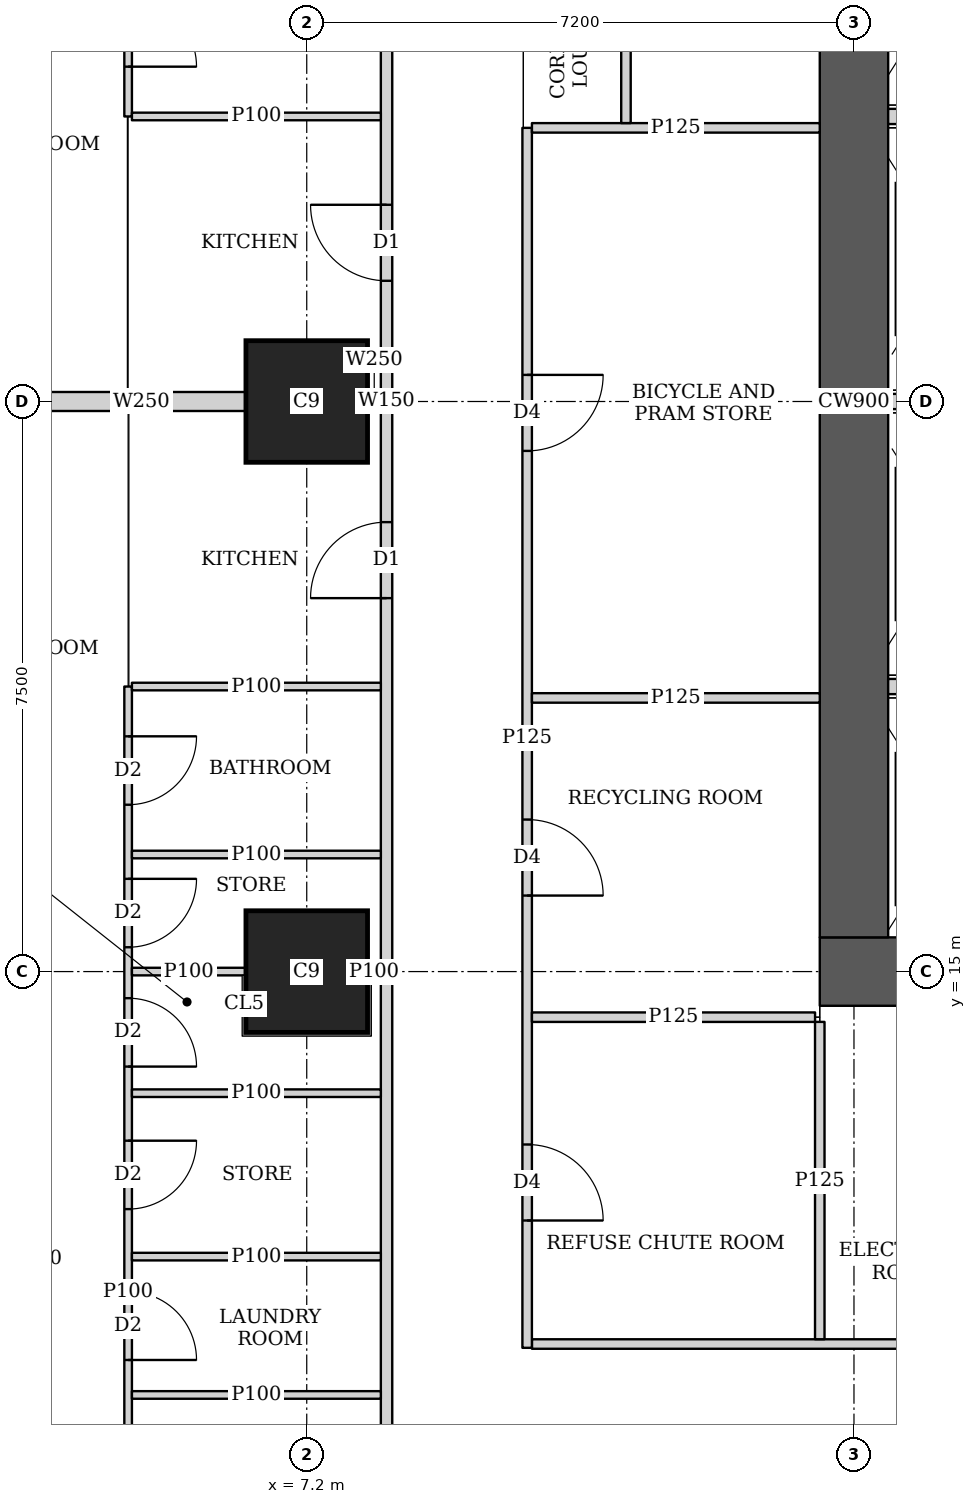
"""IFC4 building model, lengths in metres.
Left out: names, types, materials, properties, quantities, classifications, styles, units other than length and angle.
Written with IfcOpenShell. Run it as: python <this file> out.ifc"""

import sys

from ifc_helpers import new_model, si_unit, direction, frame, frame_2d, origin, origin_2d, place, context, subcontext, project, spatial, rectangle, extrude, element, fill, save


model = new_model("IFC4")
c1 = context("Model", 3, precision=1e-05, world=origin(), true_north=direction((0.0, 1.0)))
c2 = subcontext(c1, "Body", "Model", "MODEL_VIEW")
j1 = project(units=[si_unit("LENGTHUNIT", "METRE"), si_unit("PLANEANGLEUNIT", "RADIAN")], contexts=[c1])
p1 = place(None, origin())
s1 = spatial("IfcSite", under=j1, at=p1, CompositionType="ELEMENT")
p2 = place(p1, origin())
s2 = spatial("IfcBuilding", under=s1, at=p2, CompositionType="ELEMENT")
p3 = place(p2, frame((0.0, 0.0, 81.65)))
s3 = spatial("IfcBuildingStorey", under=s2, at=p3, CompositionType="ELEMENT", Elevation=81.65)
for number, where, z_axis, x_axis in (
    (1, (7.2, 15.0, 0.0), (0.0, 0.0, 1.0), (1.0, 0.0, 0.0)),
    (2, (7.2, 22.5, 0.0), (0.0, 0.0, 1.0), (1.0, 0.0, 0.0)),
):
    element("IfcColumn", number, at=place(p3, frame(where, z_axis=z_axis, x_axis=x_axis)), inside=s3, PredefinedType="COLUMN", context=c2, shape_type="SweptSolid", body=[
        extrude(rectangle(XDim=1.6, YDim=1.6, at=origin_2d()), origin(), (0.0, 0.0, 1.0), 3.75),
    ])
p4 = place(p3, frame((13.95, 15.0, 0.0), z_axis=(0.0, 0.0, 1.0), x_axis=(1.0, 0.0, 0.0)))
e3 = element("IfcWall", 3, at=p4, inside=s3, PredefinedType="SHEAR", context=c2, shape_type="SweptSolid", body=[
    extrude(rectangle(XDim=15.3, YDim=0.9, at=frame_2d((7.65, 0.0))), origin(), (0.0, 0.0, 1.0), 3.75),
])
p5 = place(p4, frame((4.45, 0.0, 0.0)))
e4 = element("IfcOpeningElement", 4, at=p5, cuts=e3, PredefinedType="OPENING", context=c2, shape_type="SweptSolid", body=[
    extrude(rectangle(XDim=1.8, YDim=2.1, at=frame_2d((0.9, 1.05))), frame((0.0, 0.46, 0.0), z_axis=(0.0, -1.0, 0.0), x_axis=(1.0, 0.0, 0.0)), (0.0, 0.0, 1.0), 0.92),
])
p6 = place(p4, frame((10.7, 0.0, 0.0)))
e5 = element("IfcOpeningElement", 5, at=p6, cuts=e3, PredefinedType="OPENING", context=c2, shape_type="SweptSolid", body=[
    extrude(rectangle(XDim=1.1, YDim=2.1, at=frame_2d((0.55, 1.05))), frame((0.0, 0.46, 0.0), z_axis=(0.0, -1.0, 0.0), x_axis=(1.0, 0.0, 0.0)), (0.0, 0.0, 1.0), 0.92),
])
p7 = place(p3, frame((14.4, 15.45, 0.0), z_axis=(0.0, 0.0, 1.0), x_axis=(0.0, 1.0, 0.0)))
e6 = element("IfcWall", 6, at=p7, inside=s3, PredefinedType="SHEAR", context=c2, shape_type="SweptSolid", body=[
    extrude(rectangle(XDim=14.1, YDim=0.9, at=frame_2d((7.05, 0.0))), origin(), (0.0, 0.0, 1.0), 3.75),
])
p8 = place(p3, frame((8.25, 2.126, 0.0), z_axis=(0.0, 0.0, 1.0), x_axis=(0.0, 1.0, 0.0)))
e7 = element("IfcWall", 7, at=p8, inside=s3, PredefinedType="SOLIDWALL", context=c2, shape_type="SweptSolid", body=[
    extrude(rectangle(XDim=40.773, YDim=0.15, at=frame_2d((20.386, 0.0))), origin(), (0.0, 0.0, 1.0), 3.5),
])
p9 = place(p8, frame((17.787, 0.0, 0.0)))
e8 = element("IfcOpeningElement", 8, at=p9, cuts=e7, PredefinedType="OPENING", context=c2, shape_type="SweptSolid", body=[
    extrude(rectangle(XDim=1.0, YDim=2.1, at=frame_2d((0.5, 1.05))), frame((0.0, 0.085, 0.0), z_axis=(0.0, -1.0, 0.0), x_axis=(1.0, 0.0, 0.0)), (0.0, 0.0, 1.0), 0.17),
])
p10 = place(p8, frame((21.962, 0.0, 0.0)))
e9 = element("IfcOpeningElement", 9, at=p10, cuts=e7, PredefinedType="OPENING", context=c2, shape_type="SweptSolid", body=[
    extrude(rectangle(XDim=1.0, YDim=2.1, at=frame_2d((0.5, 1.05))), frame((0.0, 0.085, 0.0), z_axis=(0.0, -1.0, 0.0), x_axis=(1.0, 0.0, 0.0)), (0.0, 0.0, 1.0), 0.17),
])
p11 = place(p8, frame((32.787, 0.0, 0.0)))
e10 = element("IfcOpeningElement", 10, at=p11, cuts=e7, PredefinedType="OPENING", context=c2, shape_type="SweptSolid", body=[
    extrude(rectangle(XDim=1.0, YDim=2.1, at=frame_2d((0.5, 1.05))), frame((0.0, 0.085, 0.0), z_axis=(0.0, -1.0, 0.0), x_axis=(1.0, 0.0, 0.0)), (0.0, 0.0, 1.0), 0.17),
])
p12 = place(p3, frame((4.85, 2.812, 0.0), z_axis=(0.0, 0.0, 1.0), x_axis=(0.0, 1.0, 0.0)))
e11 = element("IfcWall", 11, at=p12, inside=s3, PredefinedType="PARTITIONING", context=c2, shape_type="SweptSolid", body=[
    extrude(rectangle(XDim=15.938, YDim=0.1, at=frame_2d((7.969, 0.0))), origin(), (0.0, 0.0, 1.0), 3.5),
])
p13 = place(p12, frame((14.383, 0.0, 0.0)))
e12 = element("IfcOpeningElement", 12, at=p13, cuts=e11, PredefinedType="OPENING", context=c2, shape_type="SweptSolid", body=[
    extrude(rectangle(XDim=0.9, YDim=2.1, at=frame_2d((0.45, 1.05))), frame((0.0, 0.06, 0.0), z_axis=(0.0, -1.0, 0.0), x_axis=(1.0, 0.0, 0.0)), (0.0, 0.0, 1.0), 0.12),
])
p14 = place(p12, frame((10.938, 0.0, 0.0)))
e13 = element("IfcOpeningElement", 13, at=p14, cuts=e11, PredefinedType="OPENING", context=c2, shape_type="SweptSolid", body=[
    extrude(rectangle(XDim=0.9, YDim=2.1, at=frame_2d((0.45, 1.05))), frame((0.0, 0.06, 0.0), z_axis=(0.0, -1.0, 0.0), x_axis=(1.0, 0.0, 0.0)), (0.0, 0.0, 1.0), 0.12),
])
p15 = place(p12, frame((7.078, 0.0, 0.0)))
e14 = element("IfcOpeningElement", 14, at=p15, cuts=e11, PredefinedType="OPENING", context=c2, shape_type="SweptSolid", body=[
    extrude(rectangle(XDim=0.9, YDim=2.1, at=frame_2d((0.45, 1.05))), frame((0.0, 0.06, 0.0), z_axis=(0.0, -1.0, 0.0), x_axis=(1.0, 0.0, 0.0)), (0.0, 0.0, 1.0), 0.12),
])
p16 = place(p12, frame((2.363, 0.0, 0.0)))
e15 = element("IfcOpeningElement", 15, at=p16, cuts=e11, PredefinedType="OPENING", context=c2, shape_type="SweptSolid", body=[
    extrude(rectangle(XDim=0.9, YDim=2.1, at=frame_2d((0.45, 1.05))), frame((0.0, 0.06, 0.0), z_axis=(0.0, -1.0, 0.0), x_axis=(1.0, 0.0, 0.0)), (0.0, 0.0, 1.0), 0.12),
])
p17 = place(p12, frame((12.508, 0.0, 0.0)))
e16 = element("IfcOpeningElement", 16, at=p17, cuts=e11, PredefinedType="OPENING", context=c2, shape_type="SweptSolid", body=[
    extrude(rectangle(XDim=0.9, YDim=2.1, at=frame_2d((0.45, 1.05))), frame((0.0, 0.06, 0.0), z_axis=(0.0, -1.0, 0.0), x_axis=(1.0, 0.0, 0.0)), (0.0, 0.0, 1.0), 0.12),
])
p18 = place(p12, frame((9.063, 0.0, 0.0)))
e17 = element("IfcOpeningElement", 17, at=p18, cuts=e11, PredefinedType="OPENING", context=c2, shape_type="SweptSolid", body=[
    extrude(rectangle(XDim=0.9, YDim=2.1, at=frame_2d((0.45, 1.05))), frame((0.0, 0.06, 0.0), z_axis=(0.0, -1.0, 0.0), x_axis=(1.0, 0.0, 0.0)), (0.0, 0.0, 1.0), 0.12),
])
p19 = place(p12, frame((5.203, 0.0, 0.0)))
e18 = element("IfcOpeningElement", 18, at=p19, cuts=e11, PredefinedType="OPENING", context=c2, shape_type="SweptSolid", body=[
    extrude(rectangle(XDim=0.9, YDim=2.1, at=frame_2d((0.45, 1.05))), frame((0.0, 0.06, 0.0), z_axis=(0.0, -1.0, 0.0), x_axis=(1.0, 0.0, 0.0)), (0.0, 0.0, 1.0), 0.12),
])
p20 = place(p3, frame((4.9, 11.25, 0.0), z_axis=(0.0, 0.0, 1.0), x_axis=(1.0, 0.0, 0.0)))
e19 = element("IfcWall", 19, at=p20, inside=s3, PredefinedType="PARTITIONING", context=c2, shape_type="SweptSolid", body=[
    extrude(rectangle(XDim=3.275, YDim=0.1, at=frame_2d((1.638, 0.0))), origin(), (0.0, 0.0, 1.0), 3.5),
])
p21 = place(p3, frame((4.9, 15.0, 0.0), z_axis=(0.0, 0.0, 1.0), x_axis=(1.0, 0.0, 0.0)))
e20 = element("IfcWall", 20, at=p21, inside=s3, PredefinedType="PARTITIONING", context=c2, shape_type="SweptSolid", body=[
    extrude(rectangle(XDim=1.499, YDim=0.1, at=frame_2d((0.75, 0.0))), origin(), (0.0, 0.0, 1.0), 3.5),
])
p22 = place(p3, frame((8.001, 15.0, 0.0), z_axis=(0.0, 0.0, 1.0), x_axis=(1.0, 0.0, 0.0)))
e21 = element("IfcWall", 21, at=p22, inside=s3, PredefinedType="PARTITIONING", context=c2, shape_type="SweptSolid", body=[
    extrude(rectangle(XDim=0.174, YDim=0.1, at=frame_2d((0.087, 0.0))), origin(), (0.0, 0.0, 1.0), 3.5),
])
for number, where, z_axis, x_axis in (
    (22, (4.9, 18.75, 0.0), (0.0, 0.0, 1.0), (1.0, 0.0, 0.0)),
    (23, (4.9, 16.54, 0.0), (0.0, 0.0, 1.0), (1.0, 0.0, 0.0)),
    (24, (4.9, 13.4, 0.0), (0.0, 0.0, 1.0), (1.0, 0.0, 0.0)),
    (25, (4.9, 9.43, 0.0), (0.0, 0.0, 1.0), (1.0, 0.0, 0.0)),
):
    element("IfcWall", number, at=place(p3, frame(where, z_axis=z_axis, x_axis=x_axis)), inside=s3, PredefinedType="PARTITIONING", context=c2, shape_type="SweptSolid", body=[
        extrude(rectangle(XDim=3.275, YDim=0.1, at=frame_2d((1.638, 0.0))), origin(), (0.0, 0.0, 1.0), 3.5),
    ])
p23 = place(p3, frame((4.85, 26.25, 0.0), z_axis=(0.0, 0.0, 1.0), x_axis=(0.0, 1.0, 0.0)))
e26 = element("IfcWall", 26, at=p23, inside=s3, PredefinedType="PARTITIONING", context=c2, shape_type="SweptSolid", body=[
    extrude(rectangle(XDim=7.375, YDim=0.1, at=frame_2d((3.688, 0.0))), origin(), (0.0, 0.0, 1.0), 3.5),
])
p24 = place(p23, frame((0.655, 0.0, 0.0)))
e27 = element("IfcOpeningElement", 27, at=p24, cuts=e26, PredefinedType="OPENING", context=c2, shape_type="SweptSolid", body=[
    extrude(rectangle(XDim=0.9, YDim=2.1, at=frame_2d((0.45, 1.05))), frame((0.0, 0.06, 0.0), z_axis=(0.0, -1.0, 0.0), x_axis=(1.0, 0.0, 0.0)), (0.0, 0.0, 1.0), 0.12),
])
p25 = place(p23, frame((4.1, 0.0, 0.0)))
e28 = element("IfcOpeningElement", 28, at=p25, cuts=e26, PredefinedType="OPENING", context=c2, shape_type="SweptSolid", body=[
    extrude(rectangle(XDim=0.9, YDim=2.1, at=frame_2d((0.45, 1.05))), frame((0.0, 0.06, 0.0), z_axis=(0.0, -1.0, 0.0), x_axis=(1.0, 0.0, 0.0)), (0.0, 0.0, 1.0), 0.12),
])
p26 = place(p23, frame((2.53, 0.0, 0.0)))
e29 = element("IfcOpeningElement", 29, at=p26, cuts=e26, PredefinedType="OPENING", context=c2, shape_type="SweptSolid", body=[
    extrude(rectangle(XDim=0.9, YDim=2.1, at=frame_2d((0.45, 1.05))), frame((0.0, 0.06, 0.0), z_axis=(0.0, -1.0, 0.0), x_axis=(1.0, 0.0, 0.0)), (0.0, 0.0, 1.0), 0.12),
])
p27 = place(p23, frame((5.975, 0.0, 0.0)))
e30 = element("IfcOpeningElement", 30, at=p27, cuts=e26, PredefinedType="OPENING", context=c2, shape_type="SweptSolid", body=[
    extrude(rectangle(XDim=0.9, YDim=2.1, at=frame_2d((0.45, 1.05))), frame((0.0, 0.06, 0.0), z_axis=(0.0, -1.0, 0.0), x_axis=(1.0, 0.0, 0.0)), (0.0, 0.0, 1.0), 0.12),
])
p28 = place(p3, frame((4.9, 26.25, 0.0), z_axis=(0.0, 0.0, 1.0), x_axis=(1.0, 0.0, 0.0)))
e31 = element("IfcWall", 31, at=p28, inside=s3, PredefinedType="PARTITIONING", context=c2, shape_type="SweptSolid", body=[
    extrude(rectangle(XDim=3.275, YDim=0.1, at=frame_2d((1.638, 0.0))), origin(), (0.0, 0.0, 1.0), 3.5),
])
p29 = place(p3, frame((3.65, 22.5, 0.0), z_axis=(0.0, 0.0, 1.0), x_axis=(1.0, 0.0, 0.0)))
e32 = element("IfcWall", 32, at=p29, inside=s3, PredefinedType="SOLIDWALL", context=c2, shape_type="SweptSolid", body=[
    extrude(rectangle(XDim=2.749, YDim=0.25, at=frame_2d((1.375, 0.0))), origin(), (0.0, 0.0, 1.0), 3.5),
])
p30 = place(p3, frame((8.001, 22.5, 0.0), z_axis=(0.0, 0.0, 1.0), x_axis=(1.0, 0.0, 0.0)))
e33 = element("IfcWall", 33, at=p30, inside=s3, PredefinedType="SOLIDWALL", context=c2, shape_type="SweptSolid", body=[
    extrude(rectangle(XDim=0.174, YDim=0.25, at=frame_2d((0.087, 0.0))), origin(), (0.0, 0.0, 1.0), 3.5),
])
p31 = place(p3, frame((10.1, 10.05, 0.0), z_axis=(0.0, 0.0, 1.0), x_axis=(0.0, 1.0, 0.0)))
e34 = element("IfcWall", 34, at=p31, inside=s3, PredefinedType="PARTITIONING", context=c2, shape_type="SweptSolid", body=[
    extrude(rectangle(XDim=16.05, YDim=0.125, at=frame_2d((8.025, 0.0))), origin(), (0.0, 0.0, 1.0), 3.5),
])
p32 = place(p31, frame((1.675, 0.0, 0.0)))
e35 = element("IfcOpeningElement", 35, at=p32, cuts=e34, PredefinedType="OPENING", context=c2, shape_type="SweptSolid", body=[
    extrude(rectangle(XDim=1.0, YDim=2.1, at=frame_2d((0.5, 1.05))), frame((0.0, 0.073, 0.0), z_axis=(0.0, -1.0, 0.0), x_axis=(1.0, 0.0, 0.0)), (0.0, 0.0, 1.0), 0.145),
])
p33 = place(p31, frame((5.95, 0.0, 0.0)))
e36 = element("IfcOpeningElement", 36, at=p33, cuts=e34, PredefinedType="OPENING", context=c2, shape_type="SweptSolid", body=[
    extrude(rectangle(XDim=1.0, YDim=2.1, at=frame_2d((0.5, 1.05))), frame((0.0, 0.073, 0.0), z_axis=(0.0, -1.0, 0.0), x_axis=(1.0, 0.0, 0.0)), (0.0, 0.0, 1.0), 0.145),
])
p34 = place(p31, frame((11.8, 0.0, 0.0)))
e37 = element("IfcOpeningElement", 37, at=p34, cuts=e34, PredefinedType="OPENING", context=c2, shape_type="SweptSolid", body=[
    extrude(rectangle(XDim=1.0, YDim=2.1, at=frame_2d((0.5, 1.05))), frame((0.0, 0.073, 0.0), z_axis=(0.0, -1.0, 0.0), x_axis=(1.0, 0.0, 0.0)), (0.0, 0.0, 1.0), 0.145),
])
p35 = place(p3, frame((11.4, 26.163, 0.0), z_axis=(0.0, 0.0, 1.0), x_axis=(0.0, 1.0, 0.0)))
e38 = element("IfcWall", 38, at=p35, inside=s3, PredefinedType="PARTITIONING", context=c2, shape_type="SweptSolid", body=[
    extrude(rectangle(XDim=5.275, YDim=0.125, at=frame_2d((2.637, 0.0))), origin(), (0.0, 0.0, 1.0), 3.5),
])
p36 = place(p35, frame((2.137, 0.0, 0.0)))
e39 = element("IfcOpeningElement", 39, at=p36, cuts=e38, PredefinedType="OPENING", context=c2, shape_type="SweptSolid", body=[
    extrude(rectangle(XDim=1.0, YDim=2.1, at=frame_2d((0.5, 1.05))), frame((0.0, 0.073, 0.0), z_axis=(0.0, -1.0, 0.0), x_axis=(1.0, 0.0, 0.0)), (0.0, 0.0, 1.0), 0.145),
])
p37 = place(p3, frame((10.163, 14.4, 0.0), z_axis=(0.0, 0.0, 1.0), x_axis=(1.0, 0.0, 0.0)))
e40 = element("IfcWall", 40, at=p37, inside=s3, PredefinedType="PARTITIONING", context=c2, shape_type="SweptSolid", body=[
    extrude(rectangle(XDim=3.725, YDim=0.125, at=frame_2d((1.862, 0.0))), origin(), (0.0, 0.0, 1.0), 3.5),
])
for number, where, z_axis, x_axis in (
    (41, (10.163, 18.6, 0.0), (0.0, 0.0, 1.0), (1.0, 0.0, 0.0)),
    (42, (10.163, 26.1, 0.0), (0.0, 0.0, 1.0), (1.0, 0.0, 0.0)),
):
    element("IfcWall", number, at=place(p3, frame(where, z_axis=z_axis, x_axis=x_axis)), inside=s3, PredefinedType="PARTITIONING", context=c2, shape_type="SweptSolid", body=[
        extrude(rectangle(XDim=3.787, YDim=0.125, at=frame_2d((1.894, 0.0))), origin(), (0.0, 0.0, 1.0), 3.5),
    ])
p38 = place(p3, frame((13.95, 10.163, 0.0), z_axis=(0.0, 0.0, 1.0), x_axis=(0.0, 1.0, 0.0)))
e43 = element("IfcWall", 43, at=p38, inside=s3, PredefinedType="PARTITIONING", context=c2, shape_type="SweptSolid", body=[
    extrude(rectangle(XDim=4.175, YDim=0.125, at=frame_2d((2.087, 0.0))), origin(), (0.0, 0.0, 1.0), 3.5),
])
p39 = place(p3, frame((10.163, 10.1, 0.0), z_axis=(0.0, 0.0, 1.0), x_axis=(1.0, 0.0, 0.0)))
e44 = element("IfcWall", 44, at=p39, inside=s3, PredefinedType="PARTITIONING", context=c2, shape_type="SweptSolid", body=[
    extrude(rectangle(XDim=11.287, YDim=0.125, at=frame_2d((5.644, 0.0))), origin(), (0.0, 0.0, 1.0), 3.5),
])
p40 = place(p39, frame((7.832, 0.0, 0.0)))
e45 = element("IfcOpeningElement", 45, at=p40, cuts=e44, PredefinedType="OPENING", context=c2, shape_type="SweptSolid", body=[
    extrude(rectangle(XDim=1.8, YDim=2.1, at=frame_2d((0.9, 1.05))), frame((0.0, 0.073, 0.0), z_axis=(0.0, -1.0, 0.0), x_axis=(1.0, 0.0, 0.0)), (0.0, 0.0, 1.0), 0.145),
])
for number, where, z_axis, x_axis in (
    (46, (14.85, 18.75, 0.0), (0.0, 0.0, 1.0), (1.0, 0.0, 0.0)),
    (47, (14.85, 22.5, 0.0), (0.0, 0.0, 1.0), (1.0, 0.0, 0.0)),
    (48, (14.85, 26.25, 0.0), (0.0, 0.0, 1.0), (1.0, 0.0, 0.0)),
):
    element("IfcWall", number, at=place(p3, frame(where, z_axis=z_axis, x_axis=x_axis)), inside=s3, PredefinedType="SOLIDWALL", context=c2, shape_type="SweptSolid", body=[
        extrude(rectangle(XDim=1.95, YDim=0.2, at=frame_2d((0.975, 0.0))), origin(), (0.0, 0.0, 1.0), 3.5),
    ])
p41 = place(p13, origin())
e49 = element("IfcDoor", 49, at=p41, inside=s3, OperationType="SINGLE_SWING_LEFT", PredefinedType="DOOR", context=c2, shape_type="SweptSolid", body=[
    extrude(rectangle(XDim=0.9, YDim=2.1, at=frame_2d((0.45, 1.05))), frame((0.0, 0.025, 0.0), z_axis=(0.0, -1.0, 0.0), x_axis=(1.0, 0.0, 0.0)), (0.0, 0.0, 1.0), 0.05),
])
fill(e12, e49)
p42 = place(p14, origin())
e50 = element("IfcDoor", 50, at=p42, inside=s3, OperationType="SINGLE_SWING_RIGHT", PredefinedType="DOOR", context=c2, shape_type="SweptSolid", body=[
    extrude(rectangle(XDim=0.9, YDim=2.1, at=frame_2d((0.45, 1.05))), frame((0.0, 0.025, 0.0), z_axis=(0.0, -1.0, 0.0), x_axis=(1.0, 0.0, 0.0)), (0.0, 0.0, 1.0), 0.05),
])
fill(e13, e50)
p43 = place(p15, origin())
e51 = element("IfcDoor", 51, at=p43, inside=s3, OperationType="SINGLE_SWING_RIGHT", PredefinedType="DOOR", context=c2, shape_type="SweptSolid", body=[
    extrude(rectangle(XDim=0.9, YDim=2.1, at=frame_2d((0.45, 1.05))), frame((0.0, 0.025, 0.0), z_axis=(0.0, -1.0, 0.0), x_axis=(1.0, 0.0, 0.0)), (0.0, 0.0, 1.0), 0.05),
])
fill(e14, e51)
p44 = place(p17, origin())
e52 = element("IfcDoor", 52, at=p44, inside=s3, OperationType="SINGLE_SWING_LEFT", PredefinedType="DOOR", context=c2, shape_type="SweptSolid", body=[
    extrude(rectangle(XDim=0.9, YDim=2.1, at=frame_2d((0.45, 1.05))), frame((0.0, 0.025, 0.0), z_axis=(0.0, -1.0, 0.0), x_axis=(1.0, 0.0, 0.0)), (0.0, 0.0, 1.0), 0.05),
])
fill(e16, e52)
p45 = place(p18, origin())
e53 = element("IfcDoor", 53, at=p45, inside=s3, OperationType="SINGLE_SWING_LEFT", PredefinedType="DOOR", context=c2, shape_type="SweptSolid", body=[
    extrude(rectangle(XDim=0.9, YDim=2.1, at=frame_2d((0.45, 1.05))), frame((0.0, 0.025, 0.0), z_axis=(0.0, -1.0, 0.0), x_axis=(1.0, 0.0, 0.0)), (0.0, 0.0, 1.0), 0.05),
])
fill(e17, e53)
p46 = place(p9, origin())
e54 = element("IfcDoor", 54, at=p46, inside=s3, OperationType="SINGLE_SWING_LEFT", PredefinedType="DOOR", context=c2, shape_type="SweptSolid", body=[
    extrude(rectangle(XDim=1.0, YDim=2.1, at=frame_2d((0.5, 1.05))), frame((0.0, 0.025, 0.0), z_axis=(0.0, -1.0, 0.0), x_axis=(1.0, 0.0, 0.0)), (0.0, 0.0, 1.0), 0.05),
])
fill(e8, e54)
p47 = place(p24, origin())
e55 = element("IfcDoor", 55, at=p47, inside=s3, OperationType="SINGLE_SWING_RIGHT", PredefinedType="DOOR", context=c2, shape_type="SweptSolid", body=[
    extrude(rectangle(XDim=0.9, YDim=2.1, at=frame_2d((0.45, 1.05))), frame((0.0, 0.025, 0.0), z_axis=(0.0, -1.0, 0.0), x_axis=(1.0, 0.0, 0.0)), (0.0, 0.0, 1.0), 0.05),
])
fill(e27, e55)
p48 = place(p10, origin())
e56 = element("IfcDoor", 56, at=p48, inside=s3, OperationType="SINGLE_SWING_RIGHT", PredefinedType="DOOR", context=c2, shape_type="SweptSolid", body=[
    extrude(rectangle(XDim=1.0, YDim=2.1, at=frame_2d((0.5, 1.05))), frame((0.0, 0.025, 0.0), z_axis=(0.0, -1.0, 0.0), x_axis=(1.0, 0.0, 0.0)), (0.0, 0.0, 1.0), 0.05),
])
fill(e9, e56)
p49 = place(p32, origin())
e57 = element("IfcDoor", 57, at=p49, inside=s3, OperationType="SINGLE_SWING_RIGHT", PredefinedType="DOOR", context=c2, shape_type="SweptSolid", body=[
    extrude(rectangle(XDim=1.0, YDim=2.1, at=frame_2d((0.5, 1.05))), frame((0.0, 0.025, 0.0), z_axis=(0.0, -1.0, 0.0), x_axis=(1.0, 0.0, 0.0)), (0.0, 0.0, 1.0), 0.05),
])
fill(e35, e57)
p50 = place(p33, origin())
e58 = element("IfcDoor", 58, at=p50, inside=s3, OperationType="SINGLE_SWING_RIGHT", PredefinedType="DOOR", context=c2, shape_type="SweptSolid", body=[
    extrude(rectangle(XDim=1.0, YDim=2.1, at=frame_2d((0.5, 1.05))), frame((0.0, 0.025, 0.0), z_axis=(0.0, -1.0, 0.0), x_axis=(1.0, 0.0, 0.0)), (0.0, 0.0, 1.0), 0.05),
])
fill(e36, e58)
p51 = place(p34, origin())
e59 = element("IfcDoor", 59, at=p51, inside=s3, OperationType="SINGLE_SWING_LEFT", PredefinedType="DOOR", context=c2, shape_type="SweptSolid", body=[
    extrude(rectangle(XDim=1.0, YDim=2.1, at=frame_2d((0.5, 1.05))), frame((0.0, 0.025, 0.0), z_axis=(0.0, -1.0, 0.0), x_axis=(1.0, 0.0, 0.0)), (0.0, 0.0, 1.0), 0.05),
])
fill(e37, e59)
save(model, sys.argv[1])
